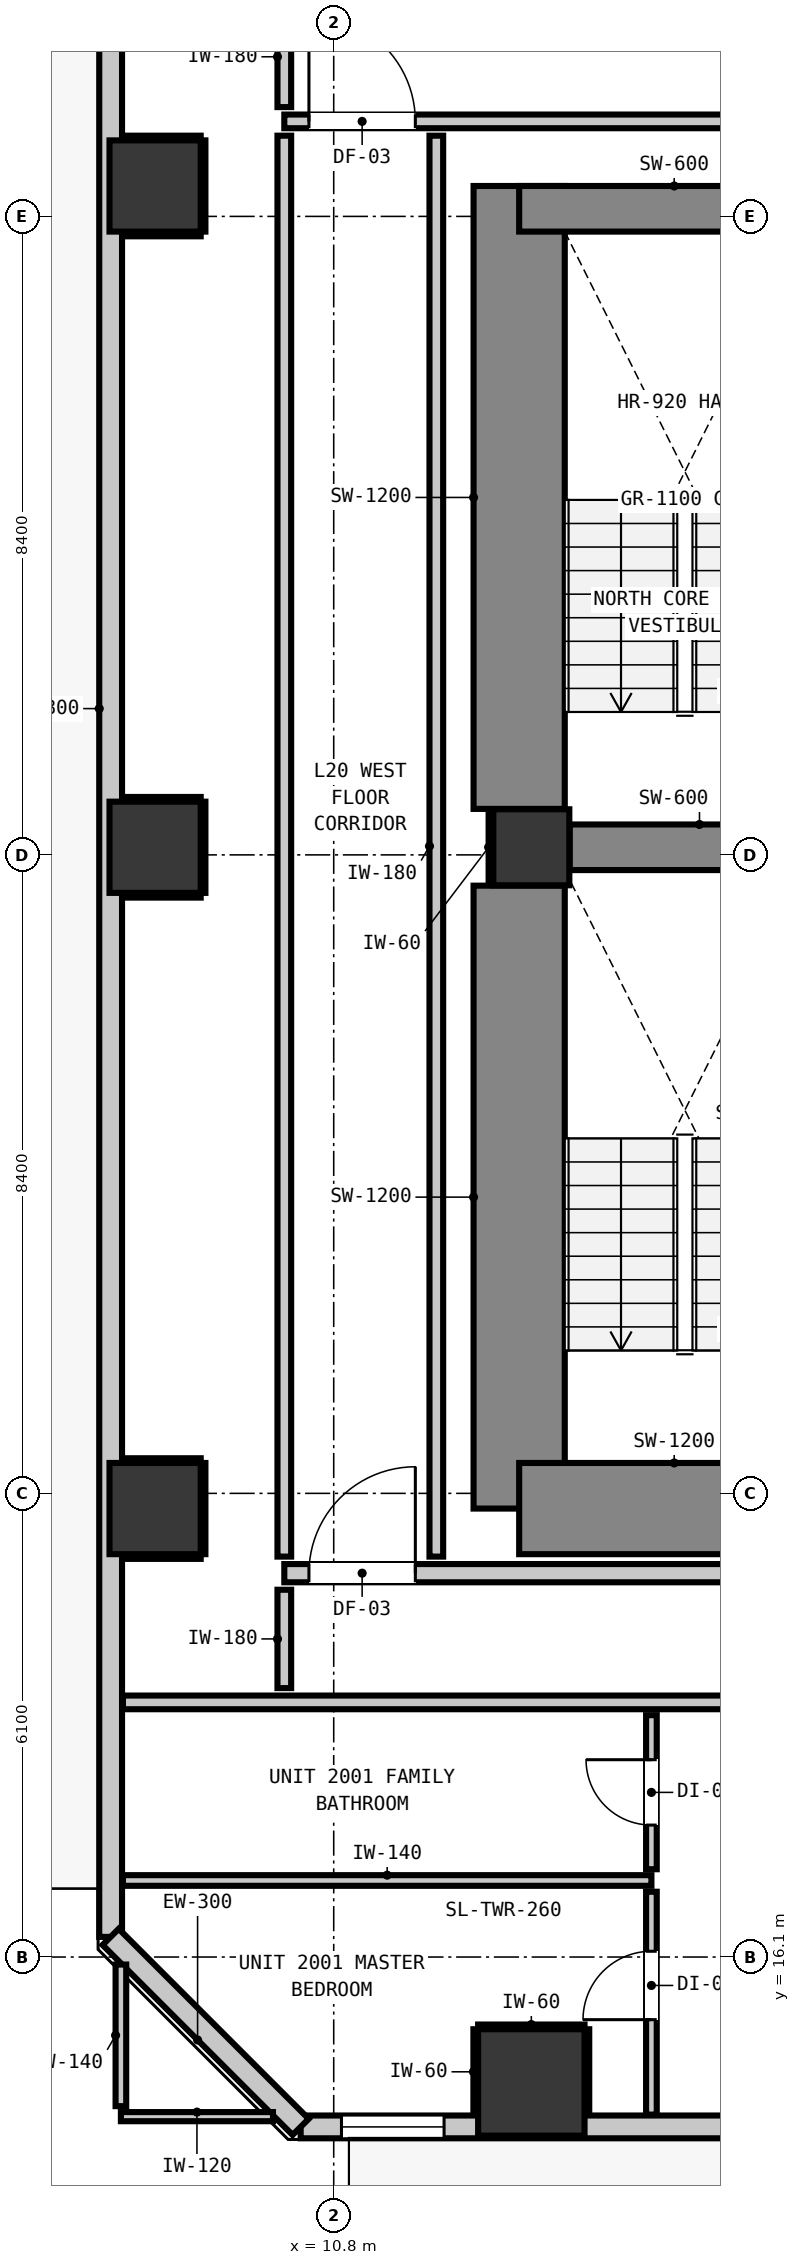
"""IFC4 building model, lengths in metres.
Left out: names, types, materials, properties, quantities, classifications, styles, units other than length and angle.
Written with IfcOpenShell. Run it as: python <this file> out.ifc"""

import sys

from ifc_helpers import new_model, si_unit, direction, frame, frame_2d, origin, origin_2d, place, context, subcontext, project, spatial, rectangle, extrude, element, fill, save


model = new_model("IFC4")
c1 = context("Model", 3, precision=1e-05, world=origin(), true_north=direction((0.0, 1.0)))
c2 = subcontext(c1, "Body", "Model", "MODEL_VIEW")
j1 = project(units=[si_unit("LENGTHUNIT", "METRE"), si_unit("PLANEANGLEUNIT", "RADIAN")], contexts=[c1])
p1 = place(None, origin())
s1 = spatial("IfcSite", under=j1, at=p1, CompositionType="ELEMENT")
p2 = place(p1, origin())
s2 = spatial("IfcBuilding", under=s1, at=p2, CompositionType="ELEMENT")
p3 = place(p2, frame((0.0, 0.0, 71.8)))
s3 = spatial("IfcBuildingStorey", under=s2, at=p3, CompositionType="ELEMENT", Elevation=71.8)
p4 = place(p3, frame((13.4, 30.7, 0.0), z_axis=(0.0, 0.0, 1.0), x_axis=(1.0, 0.0, 0.0)))
e1 = element("IfcColumn", 1, at=p4, inside=s3, PredefinedType="COLUMN", context=c2, shape_type="SweptSolid", body=[
    extrude(rectangle(XDim=1.0, YDim=1.0, at=origin_2d()), origin(), (0.0, 0.0, 1.0), 3.32),
])
p5 = place(p3, frame((13.24, 22.0, 0.0), z_axis=(0.0, 0.0, 1.0), x_axis=(0.0, 1.0, 0.0)))
e2 = element("IfcWall", 2, at=p5, inside=s3, PredefinedType="SHEAR", context=c2, shape_type="SweptSolid", body=[
    extrude(rectangle(XDim=8.195, YDim=1.2, at=frame_2d((4.098, 0.0))), origin(), (0.0, 0.0, 1.0), 3.32),
])
p6 = place(p3, frame((13.24, 31.205, 0.0), z_axis=(0.0, 0.0, 1.0), x_axis=(0.0, 1.0, 0.0)))
e3 = element("IfcWall", 3, at=p6, inside=s3, PredefinedType="SHEAR", context=c2, shape_type="SweptSolid", body=[
    extrude(rectangle(XDim=8.195, YDim=1.2, at=frame_2d((4.097, 0.0))), origin(), (0.0, 0.0, 1.0), 3.32),
])
p7 = place(p3, frame((13.24, 22.0, 0.0), z_axis=(0.0, 0.0, 1.0), x_axis=(1.0, 0.0, 0.0)))
e4 = element("IfcWall", 4, at=p7, inside=s3, PredefinedType="SHEAR", context=c2, shape_type="SweptSolid", body=[
    extrude(rectangle(XDim=4.08, YDim=1.2, at=frame_2d((2.04, 0.0))), origin(), (0.0, 0.0, 1.0), 3.32),
])
p8 = place(p3, frame((13.24, 39.1, 0.0), z_axis=(0.0, 0.0, 1.0), x_axis=(1.0, 0.0, 0.0)))
e5 = element("IfcWall", 5, at=p8, inside=s3, PredefinedType="SHEAR", context=c2, shape_type="SweptSolid", body=[
    extrude(rectangle(XDim=4.08, YDim=0.6, at=frame_2d((2.04, 0.0))), origin(), (0.0, 0.0, 1.0), 3.32),
])
p9 = place(p3, frame((13.905, 30.7, 0.0), z_axis=(0.0, 0.0, 1.0), x_axis=(1.0, 0.0, 0.0)))
e6 = element("IfcWall", 6, at=p9, inside=s3, PredefinedType="SHEAR", context=c2, shape_type="SweptSolid", body=[
    extrude(rectangle(XDim=3.415, YDim=0.6, at=frame_2d((1.708, 0.0))), origin(), (0.0, 0.0, 1.0), 3.32),
])
p10 = place(p3, frame((13.4, 14.45, 0.0), z_axis=(0.0, 0.0, 1.0), x_axis=(1.0, 0.0, 0.0)))
e7 = element("IfcColumn", 7, at=p10, inside=s3, PredefinedType="COLUMN", context=c2, shape_type="SweptSolid", body=[
    extrude(rectangle(XDim=1.4, YDim=1.4, at=origin_2d()), origin(), (0.0, 0.0, 1.0), 3.32),
])
for number, where, z_axis, x_axis in (
    (8, (8.45, 22.0, 0.0), (0.0, 0.0, 1.0), (1.0, 0.0, 0.0)),
    (9, (8.45, 30.7, 0.0), (0.0, 0.0, 1.0), (1.0, 0.0, 0.0)),
    (10, (8.45, 39.4, 0.0), (0.0, 0.0, 1.0), (1.0, 0.0, 0.0)),
):
    element("IfcColumn", number, at=place(p3, frame(where, z_axis=z_axis, x_axis=x_axis)), inside=s3, PredefinedType="COLUMN", context=c2, shape_type="SweptSolid", body=[
        extrude(rectangle(XDim=1.2, YDim=1.2, at=origin_2d()), origin(), (0.0, 0.0, 1.0), 3.32),
    ])
p11 = place(p3, frame((7.865, 16.365, 0.0), z_axis=(0.0, 0.0, 1.0), x_axis=(0.0, 1.0, 0.0)))
e11 = element("IfcWall", 11, at=p11, inside=s3, PredefinedType="STANDARD", context=c2, shape_type="SweptSolid", body=[
    extrude(rectangle(XDim=34.67, YDim=0.3, at=frame_2d((17.335, 0.0))), origin(), (0.0, 0.0, 1.0), 3.06),
])
p12 = place(p11, frame((32.419, 0.0, 0.0)))
e12 = element("IfcOpeningElement", 12, at=p12, cuts=e11, PredefinedType="OPENING", context=c2, shape_type="SweptSolid", body=[
    extrude(rectangle(XDim=1.0, YDim=2.15, at=frame_2d((0.5, 1.075))), frame((0.0, 0.16, 0.0), z_axis=(0.0, -1.0, 0.0), x_axis=(1.0, 0.0, 0.0)), (0.0, 0.0, 1.0), 0.32),
])
p13 = place(p11, frame((33.809, 0.0, 0.85)))
e13 = element("IfcOpeningElement", 13, at=p13, cuts=e11, PredefinedType="OPENING", context=c2, shape_type="SweptSolid", body=[
    extrude(rectangle(XDim=0.58, YDim=1.5, at=frame_2d((0.29, 0.75))), frame((0.0, 0.16, 0.0), z_axis=(0.0, -1.0, 0.0), x_axis=(1.0, 0.0, 0.0)), (0.0, 0.0, 1.0), 0.32),
])
p14 = place(p3, frame((47.835, 13.865, 0.0), z_axis=(0.0, 0.0, 1.0), x_axis=(-1.0, 0.0, 0.0)))
e14 = element("IfcWall", 14, at=p14, inside=s3, PredefinedType="STANDARD", context=c2, shape_type="SweptSolid", body=[
    extrude(rectangle(XDim=37.47, YDim=0.3, at=frame_2d((18.735, 0.0))), origin(), (0.0, 0.0, 1.0), 3.06),
])
p15 = place(p14, frame((0.901, 0.0, 0.0)))
e15 = element("IfcOpeningElement", 15, at=p15, cuts=e14, PredefinedType="OPENING", context=c2, shape_type="SweptSolid", body=[
    extrude(rectangle(XDim=1.0, YDim=2.15, at=frame_2d((0.5, 1.075))), frame((0.0, 0.16, 0.0), z_axis=(0.0, -1.0, 0.0), x_axis=(1.0, 0.0, 0.0)), (0.0, 0.0, 1.0), 0.32),
])
p16 = place(p14, frame((29.57, 0.0, 0.85)))
e16 = element("IfcOpeningElement", 16, at=p16, cuts=e14, PredefinedType="OPENING", context=c2, shape_type="SweptSolid", body=[
    extrude(rectangle(XDim=1.35, YDim=1.85, at=frame_2d((0.675, 0.925))), frame((0.0, 0.16, 0.0), z_axis=(0.0, -1.0, 0.0), x_axis=(1.0, 0.0, 0.0)), (0.0, 0.0, 1.0), 0.32),
])
p17 = place(p14, frame((35.583, 0.0, 0.85)))
e17 = element("IfcOpeningElement", 17, at=p17, cuts=e14, PredefinedType="OPENING", context=c2, shape_type="SweptSolid", body=[
    extrude(rectangle(XDim=1.35, YDim=1.85, at=frame_2d((0.675, 0.925))), frame((0.0, 0.16, 0.0), z_axis=(0.0, -1.0, 0.0), x_axis=(1.0, 0.0, 0.0)), (0.0, 0.0, 1.0), 0.32),
])
p18 = place(p14, frame((22.126, 0.0, 0.85)))
e18 = element("IfcOpeningElement", 18, at=p18, cuts=e14, PredefinedType="OPENING", context=c2, shape_type="SweptSolid", body=[
    extrude(rectangle(XDim=1.35, YDim=1.85, at=frame_2d((0.675, 0.925))), frame((0.0, 0.16, 0.0), z_axis=(0.0, -1.0, 0.0), x_axis=(1.0, 0.0, 0.0)), (0.0, 0.0, 1.0), 0.32),
])
p19 = place(p14, frame((15.814, 0.0, 0.85)))
e19 = element("IfcOpeningElement", 19, at=p19, cuts=e14, PredefinedType="OPENING", context=c2, shape_type="SweptSolid", body=[
    extrude(rectangle(XDim=1.35, YDim=1.85, at=frame_2d((0.675, 0.925))), frame((0.0, 0.16, 0.0), z_axis=(0.0, -1.0, 0.0), x_axis=(1.0, 0.0, 0.0)), (0.0, 0.0, 1.0), 0.32),
])
p20 = place(p14, frame((5.7, 0.0, 0.85)))
e20 = element("IfcOpeningElement", 20, at=p20, cuts=e14, PredefinedType="OPENING", context=c2, shape_type="SweptSolid", body=[
    extrude(rectangle(XDim=1.35, YDim=1.85, at=frame_2d((0.675, 0.925))), frame((0.0, 0.16, 0.0), z_axis=(0.0, -1.0, 0.0), x_axis=(1.0, 0.0, 0.0)), (0.0, 0.0, 1.0), 0.32),
])
p21 = place(p14, frame((12.764, 0.0, 0.85)))
e21 = element("IfcOpeningElement", 21, at=p21, cuts=e14, PredefinedType="OPENING", context=c2, shape_type="SweptSolid", body=[
    extrude(rectangle(XDim=1.35, YDim=1.85, at=frame_2d((0.675, 0.925))), frame((0.0, 0.16, 0.0), z_axis=(0.0, -1.0, 0.0), x_axis=(1.0, 0.0, 0.0)), (0.0, 0.0, 1.0), 0.32),
])
p22 = place(p3, frame((10.365, 13.865, 0.0), z_axis=(0.0, 0.0, 1.0), x_axis=(-0.707106781187, 0.707106781187, 0.0)))
e22 = element("IfcWall", 22, at=p22, inside=s3, PredefinedType="STANDARD", context=c2, shape_type="SweptSolid", body=[
    extrude(rectangle(XDim=3.536, YDim=0.3, at=frame_2d((1.768, 0.0))), origin(), (0.0, 0.0, 1.0), 3.06),
])
p23 = place(p3, frame((10.15, 21.15, 0.0), z_axis=(0.0, 0.0, 1.0), x_axis=(1.0, 0.0, 0.0)))
e23 = element("IfcWall", 23, at=p23, inside=s3, PredefinedType="PARTITIONING", context=c2, shape_type="SweptSolid", body=[
    extrude(rectangle(XDim=26.779, YDim=0.24, at=frame_2d((13.39, 0.0))), origin(), (0.0, 0.0, 1.0), 3.06),
])
p24 = place(p23, frame((8.06, 0.0, 0.0)))
e24 = element("IfcOpeningElement", 24, at=p24, cuts=e23, PredefinedType="OPENING", context=c2, shape_type="SweptSolid", body=[
    extrude(rectangle(XDim=1.1, YDim=2.15, at=frame_2d((0.55, 1.075))), frame((0.0, 0.13, 0.0), z_axis=(0.0, -1.0, 0.0), x_axis=(1.0, 0.0, 0.0)), (0.0, 0.0, 1.0), 0.26),
])
p25 = place(p23, frame((0.324, 0.0, 0.0)))
e25 = element("IfcOpeningElement", 25, at=p25, cuts=e23, PredefinedType="OPENING", context=c2, shape_type="SweptSolid", body=[
    extrude(rectangle(XDim=1.4, YDim=2.15, at=frame_2d((0.7, 1.075))), frame((0.0, 0.13, 0.0), z_axis=(0.0, -1.0, 0.0), x_axis=(1.0, 0.0, 0.0)), (0.0, 0.0, 1.0), 0.26),
])
p26 = place(p3, frame((8.027, 19.45, 0.0), z_axis=(0.0, 0.0, 1.0), x_axis=(1.0, 0.0, 0.0)))
e26 = element("IfcWall", 26, at=p26, inside=s3, PredefinedType="PARTITIONING", context=c2, shape_type="SweptSolid", body=[
    extrude(rectangle(XDim=28.902, YDim=0.18, at=frame_2d((14.451, 0.0))), origin(), (0.0, 0.0, 1.0), 3.06),
])
p27 = place(p26, frame((10.187, 0.0, 0.0)))
e27 = element("IfcOpeningElement", 27, at=p27, cuts=e26, PredefinedType="OPENING", context=c2, shape_type="SweptSolid", body=[
    extrude(rectangle(XDim=1.0, YDim=2.15, at=frame_2d((0.5, 1.075))), frame((0.0, 0.1, 0.0), z_axis=(0.0, -1.0, 0.0), x_axis=(1.0, 0.0, 0.0)), (0.0, 0.0, 1.0), 0.2),
])
p28 = place(p3, frame((10.15, 40.25, 0.0), z_axis=(0.0, 0.0, 1.0), x_axis=(1.0, 0.0, 0.0)))
e28 = element("IfcWall", 28, at=p28, inside=s3, PredefinedType="PARTITIONING", context=c2, shape_type="SweptSolid", body=[
    extrude(rectangle(XDim=40.023, YDim=0.18, at=frame_2d((20.012, 0.0))), origin(), (0.0, 0.0, 1.0), 3.06),
])
p29 = place(p28, frame((7.285, 0.0, 0.0)))
e29 = element("IfcOpeningElement", 29, at=p29, cuts=e28, PredefinedType="OPENING", context=c2, shape_type="SweptSolid", body=[
    extrude(rectangle(XDim=1.4, YDim=2.15, at=frame_2d((0.7, 1.075))), frame((0.0, 0.1, 0.0), z_axis=(0.0, -1.0, 0.0), x_axis=(1.0, 0.0, 0.0)), (0.0, 0.0, 1.0), 0.2),
])
p30 = place(p28, frame((0.324, 0.0, 0.0)))
e30 = element("IfcOpeningElement", 30, at=p30, cuts=e28, PredefinedType="OPENING", context=c2, shape_type="SweptSolid", body=[
    extrude(rectangle(XDim=1.4, YDim=2.15, at=frame_2d((0.7, 1.075))), frame((0.0, 0.1, 0.0), z_axis=(0.0, -1.0, 0.0), x_axis=(1.0, 0.0, 0.0)), (0.0, 0.0, 1.0), 0.2),
])
p31 = place(p28, frame((33.574, 0.0, 0.0)))
e31 = element("IfcOpeningElement", 31, at=p31, cuts=e28, PredefinedType="OPENING", context=c2, shape_type="SweptSolid", body=[
    extrude(rectangle(XDim=1.0, YDim=2.15, at=frame_2d((0.5, 1.075))), frame((0.0, 0.1, 0.0), z_axis=(0.0, -1.0, 0.0), x_axis=(1.0, 0.0, 0.0)), (0.0, 0.0, 1.0), 0.2),
])
p32 = place(p3, frame((8.027, 17.107, 0.0), z_axis=(0.0, 0.0, 1.0), x_axis=(1.0, 0.0, 0.0)))
e32 = element("IfcWall", 32, at=p32, inside=s3, PredefinedType="PARTITIONING", context=c2, shape_type="SweptSolid", body=[
    extrude(rectangle(XDim=6.953, YDim=0.14, at=frame_2d((3.477, 0.0))), origin(), (0.0, 0.0, 1.0), 3.06),
])
p33 = place(p3, frame((8.0, 14.0, 0.0), z_axis=(0.0, 0.0, 1.0), x_axis=(1.0, 0.0, 0.0)))
e33 = element("IfcWall", 33, at=p33, inside=s3, PredefinedType="PARTITIONING", context=c2, shape_type="SweptSolid", body=[
    extrude(rectangle(XDim=2.001, YDim=0.12, at=frame_2d((1.0, 0.0))), origin(), (0.0, 0.0, 1.0), 3.06),
])
p34 = place(p3, frame((10.15, 19.638, 0.0), z_axis=(0.0, 0.0, 1.0), x_axis=(0.0, 1.0, 0.0)))
e34 = element("IfcWall", 34, at=p34, inside=s3, PredefinedType="PARTITIONING", context=c2, shape_type="SweptSolid", body=[
    extrude(rectangle(XDim=1.294, YDim=0.18, at=frame_2d((0.647, 0.0))), origin(), (0.0, 0.0, 1.0), 2.445),
])
p35 = place(p3, frame((10.15, 21.368, 0.0), z_axis=(0.0, 0.0, 1.0), x_axis=(0.0, 1.0, 0.0)))
e35 = element("IfcWall", 35, at=p35, inside=s3, PredefinedType="PARTITIONING", context=c2, shape_type="SweptSolid", body=[
    extrude(rectangle(XDim=18.694, YDim=0.18, at=frame_2d((9.347, 0.0))), origin(), (0.0, 0.0, 1.0), 3.06),
])
p36 = place(p3, frame((10.15, 40.438, 0.0), z_axis=(0.0, 0.0, 1.0), x_axis=(0.0, 1.0, 0.0)))
e36 = element("IfcWall", 36, at=p36, inside=s3, PredefinedType="PARTITIONING", context=c2, shape_type="SweptSolid", body=[
    extrude(rectangle(XDim=1.324, YDim=0.18, at=frame_2d((0.662, 0.0))), origin(), (0.0, 0.0, 1.0), 3.06),
])
p37 = place(p3, frame((12.15, 21.368, 0.0), z_axis=(0.0, 0.0, 1.0), x_axis=(0.0, 1.0, 0.0)))
e37 = element("IfcWall", 37, at=p37, inside=s3, PredefinedType="PARTITIONING", context=c2, shape_type="SweptSolid", body=[
    extrude(rectangle(XDim=18.694, YDim=0.18, at=frame_2d((9.347, 0.0))), origin(), (0.0, 0.0, 1.0), 3.06),
])
p38 = place(p3, frame((8.0, 14.138, 0.0), z_axis=(0.0, 0.0, 1.0), x_axis=(0.0, 1.0, 0.0)))
e38 = element("IfcWall", 38, at=p38, inside=s3, PredefinedType="PARTITIONING", context=c2, shape_type="SweptSolid", body=[
    extrude(rectangle(XDim=1.863, YDim=0.14, at=frame_2d((0.932, 0.0))), origin(), (0.0, 0.0, 1.0), 3.06),
])
p39 = place(p3, frame((14.98, 14.027, 0.0), z_axis=(0.0, 0.0, 1.0), x_axis=(0.0, 1.0, 0.0)))
e39 = element("IfcWall", 39, at=p39, inside=s3, PredefinedType="PARTITIONING", context=c2, shape_type="SweptSolid", body=[
    extrude(rectangle(XDim=2.932, YDim=0.14, at=frame_2d((1.466, 0.0))), origin(), (0.0, 0.0, 1.0), 3.06),
])
p40 = place(p39, frame((1.249, 0.0, 0.0)))
e40 = element("IfcOpeningElement", 40, at=p40, cuts=e39, PredefinedType="OPENING", context=c2, shape_type="SweptSolid", body=[
    extrude(rectangle(XDim=0.9, YDim=2.1, at=frame_2d((0.45, 1.05))), frame((0.0, 0.08, 0.0), z_axis=(0.0, -1.0, 0.0), x_axis=(1.0, 0.0, 0.0)), (0.0, 0.0, 1.0), 0.16),
])
p41 = place(p3, frame((14.98, 17.255, 0.0), z_axis=(0.0, 0.0, 1.0), x_axis=(0.0, 1.0, 0.0)))
e41 = element("IfcWall", 41, at=p41, inside=s3, PredefinedType="PARTITIONING", context=c2, shape_type="SweptSolid", body=[
    extrude(rectangle(XDim=2.027, YDim=0.14, at=frame_2d((1.014, 0.0))), origin(), (0.0, 0.0, 1.0), 3.06),
])
p42 = place(p41, frame((0.581, 0.0, 0.0)))
e42 = element("IfcOpeningElement", 42, at=p42, cuts=e41, PredefinedType="OPENING", context=c2, shape_type="SweptSolid", body=[
    extrude(rectangle(XDim=0.86, YDim=2.02, at=frame_2d((0.43, 1.01))), frame((0.0, 0.08, 0.0), z_axis=(0.0, -1.0, 0.0), x_axis=(1.0, 0.0, 0.0)), (0.0, 0.0, 1.0), 0.16),
])
p43 = place(p3, frame((12.868, 30.21, 0.0), z_axis=(0.0, 0.0, 1.0), x_axis=(0.0, 1.0, 0.0)))
e43 = element("IfcWall", 43, at=p43, inside=s3, PredefinedType="PARTITIONING", context=c2, shape_type="SweptSolid", body=[
    extrude(rectangle(XDim=0.98, YDim=0.06, at=frame_2d((0.49, 0.0))), origin(), (0.0, 0.0, 1.0), 1.45),
])
p44 = place(p3, frame((12.7, 15.182, 0.0), z_axis=(0.0, 0.0, 1.0), x_axis=(1.0, 0.0, 0.0)))
e44 = element("IfcWall", 44, at=p44, inside=s3, PredefinedType="PARTITIONING", context=c2, shape_type="SweptSolid", body=[
    extrude(rectangle(XDim=1.4, YDim=0.06, at=frame_2d((0.7, 0.0))), origin(), (0.0, 0.0, 1.0), 1.45),
])
for number, where, z_axis, x_axis in (
    (45, (12.668, 14.03, 0.0), (0.0, 0.0, 1.0), (0.0, 1.0, 0.0)),
    (46, (14.132, 14.03, 0.0), (0.0, 0.0, 1.0), (0.0, 1.0, 0.0)),
):
    element("IfcWall", number, at=place(p3, frame(where, z_axis=z_axis, x_axis=x_axis)), inside=s3, PredefinedType="PARTITIONING", context=c2, shape_type="SweptSolid", body=[
        extrude(rectangle(XDim=1.12, YDim=0.06, at=frame_2d((0.56, 0.0))), origin(), (0.0, 0.0, 1.0), 1.45),
    ])
for number, where, z_axis, x_axis in (
    (47, (8.03, 21.368, 0.0), (0.0, 0.0, 1.0), (1.0, 0.0, 0.0)),
    (48, (8.03, 22.632, 0.0), (0.0, 0.0, 1.0), (1.0, 0.0, 0.0)),
):
    element("IfcWall", number, at=place(p3, frame(where, z_axis=z_axis, x_axis=x_axis)), inside=s3, PredefinedType="PARTITIONING", context=c2, shape_type="SweptSolid", body=[
        extrude(rectangle(XDim=1.02, YDim=0.06, at=frame_2d((0.51, 0.0))), origin(), (0.0, 0.0, 1.0), 1.45),
    ])
p45 = place(p3, frame((9.082, 21.4, 0.0), z_axis=(0.0, 0.0, 1.0), x_axis=(0.0, 1.0, 0.0)))
e49 = element("IfcWall", 49, at=p45, inside=s3, PredefinedType="PARTITIONING", context=c2, shape_type="SweptSolid", body=[
    extrude(rectangle(XDim=1.2, YDim=0.06, at=frame_2d((0.6, 0.0))), origin(), (0.0, 0.0, 1.0), 1.45),
])
for number, where, z_axis, x_axis in (
    (50, (8.03, 30.068, 0.0), (0.0, 0.0, 1.0), (1.0, 0.0, 0.0)),
    (51, (8.03, 31.332, 0.0), (0.0, 0.0, 1.0), (1.0, 0.0, 0.0)),
):
    element("IfcWall", number, at=place(p3, frame(where, z_axis=z_axis, x_axis=x_axis)), inside=s3, PredefinedType="PARTITIONING", context=c2, shape_type="SweptSolid", body=[
        extrude(rectangle(XDim=1.02, YDim=0.06, at=frame_2d((0.51, 0.0))), origin(), (0.0, 0.0, 1.0), 1.45),
    ])
p46 = place(p3, frame((9.082, 30.1, 0.0), z_axis=(0.0, 0.0, 1.0), x_axis=(0.0, 1.0, 0.0)))
e52 = element("IfcWall", 52, at=p46, inside=s3, PredefinedType="PARTITIONING", context=c2, shape_type="SweptSolid", body=[
    extrude(rectangle(XDim=1.2, YDim=0.06, at=frame_2d((0.6, 0.0))), origin(), (0.0, 0.0, 1.0), 1.45),
])
for number, where, z_axis, x_axis in (
    (53, (8.03, 38.768, 0.0), (0.0, 0.0, 1.0), (1.0, 0.0, 0.0)),
    (54, (8.03, 40.032, 0.0), (0.0, 0.0, 1.0), (1.0, 0.0, 0.0)),
):
    element("IfcWall", number, at=place(p3, frame(where, z_axis=z_axis, x_axis=x_axis)), inside=s3, PredefinedType="PARTITIONING", context=c2, shape_type="SweptSolid", body=[
        extrude(rectangle(XDim=1.02, YDim=0.06, at=frame_2d((0.51, 0.0))), origin(), (0.0, 0.0, 1.0), 1.45),
    ])
p47 = place(p3, frame((9.082, 38.8, 0.0), z_axis=(0.0, 0.0, 1.0), x_axis=(0.0, 1.0, 0.0)))
e55 = element("IfcWall", 55, at=p47, inside=s3, PredefinedType="PARTITIONING", context=c2, shape_type="SweptSolid", body=[
    extrude(rectangle(XDim=1.2, YDim=0.06, at=frame_2d((0.6, 0.0))), origin(), (0.0, 0.0, 1.0), 1.45),
])
p48 = place(p17, origin())
e56 = element("IfcWindow", 56, at=p48, inside=s3, PartitioningType="SINGLE_PANEL", PredefinedType="WINDOW", context=c2, shape_type="SweptSolid", body=[
    extrude(rectangle(XDim=1.35, YDim=1.85, at=frame_2d((0.675, 0.925))), frame((0.0, 0.03, 0.0), z_axis=(0.0, -1.0, 0.0), x_axis=(1.0, 0.0, 0.0)), (0.0, 0.0, 1.0), 0.06),
])
fill(e17, e56)
p49 = place(p25, origin())
e57 = element("IfcDoor", 57, at=p49, inside=s3, OperationType="SINGLE_SWING_RIGHT", PredefinedType="DOOR", context=c2, shape_type="SweptSolid", body=[
    extrude(rectangle(XDim=1.4, YDim=2.15, at=frame_2d((0.7, 1.075))), frame((0.0, 0.025, 0.0), z_axis=(0.0, -1.0, 0.0), x_axis=(1.0, 0.0, 0.0)), (0.0, 0.0, 1.0), 0.05),
])
fill(e25, e57)
p50 = place(p30, origin())
e58 = element("IfcDoor", 58, at=p50, inside=s3, OperationType="SINGLE_SWING_LEFT", PredefinedType="DOOR", context=c2, shape_type="SweptSolid", body=[
    extrude(rectangle(XDim=1.4, YDim=2.15, at=frame_2d((0.7, 1.075))), frame((0.0, 0.025, 0.0), z_axis=(0.0, -1.0, 0.0), x_axis=(1.0, 0.0, 0.0)), (0.0, 0.0, 1.0), 0.05),
])
fill(e30, e58)
p51 = place(p42, origin())
e59 = element("IfcDoor", 59, at=p51, inside=s3, OperationType="SINGLE_SWING_RIGHT", PredefinedType="DOOR", context=c2, shape_type="SweptSolid", body=[
    extrude(rectangle(XDim=0.86, YDim=2.02, at=frame_2d((0.43, 1.01))), frame((0.0, 0.025, 0.0), z_axis=(0.0, -1.0, 0.0), x_axis=(1.0, 0.0, 0.0)), (0.0, 0.0, 1.0), 0.05),
])
fill(e42, e59)
p52 = place(p40, origin())
e60 = element("IfcDoor", 60, at=p52, inside=s3, OperationType="SINGLE_SWING_LEFT", PredefinedType="DOOR", context=c2, shape_type="SweptSolid", body=[
    extrude(rectangle(XDim=0.9, YDim=2.1, at=frame_2d((0.45, 1.05))), frame((0.0, 0.025, 0.0), z_axis=(0.0, -1.0, 0.0), x_axis=(1.0, 0.0, 0.0)), (0.0, 0.0, 1.0), 0.05),
])
fill(e40, e60)
save(model, sys.argv[1])
